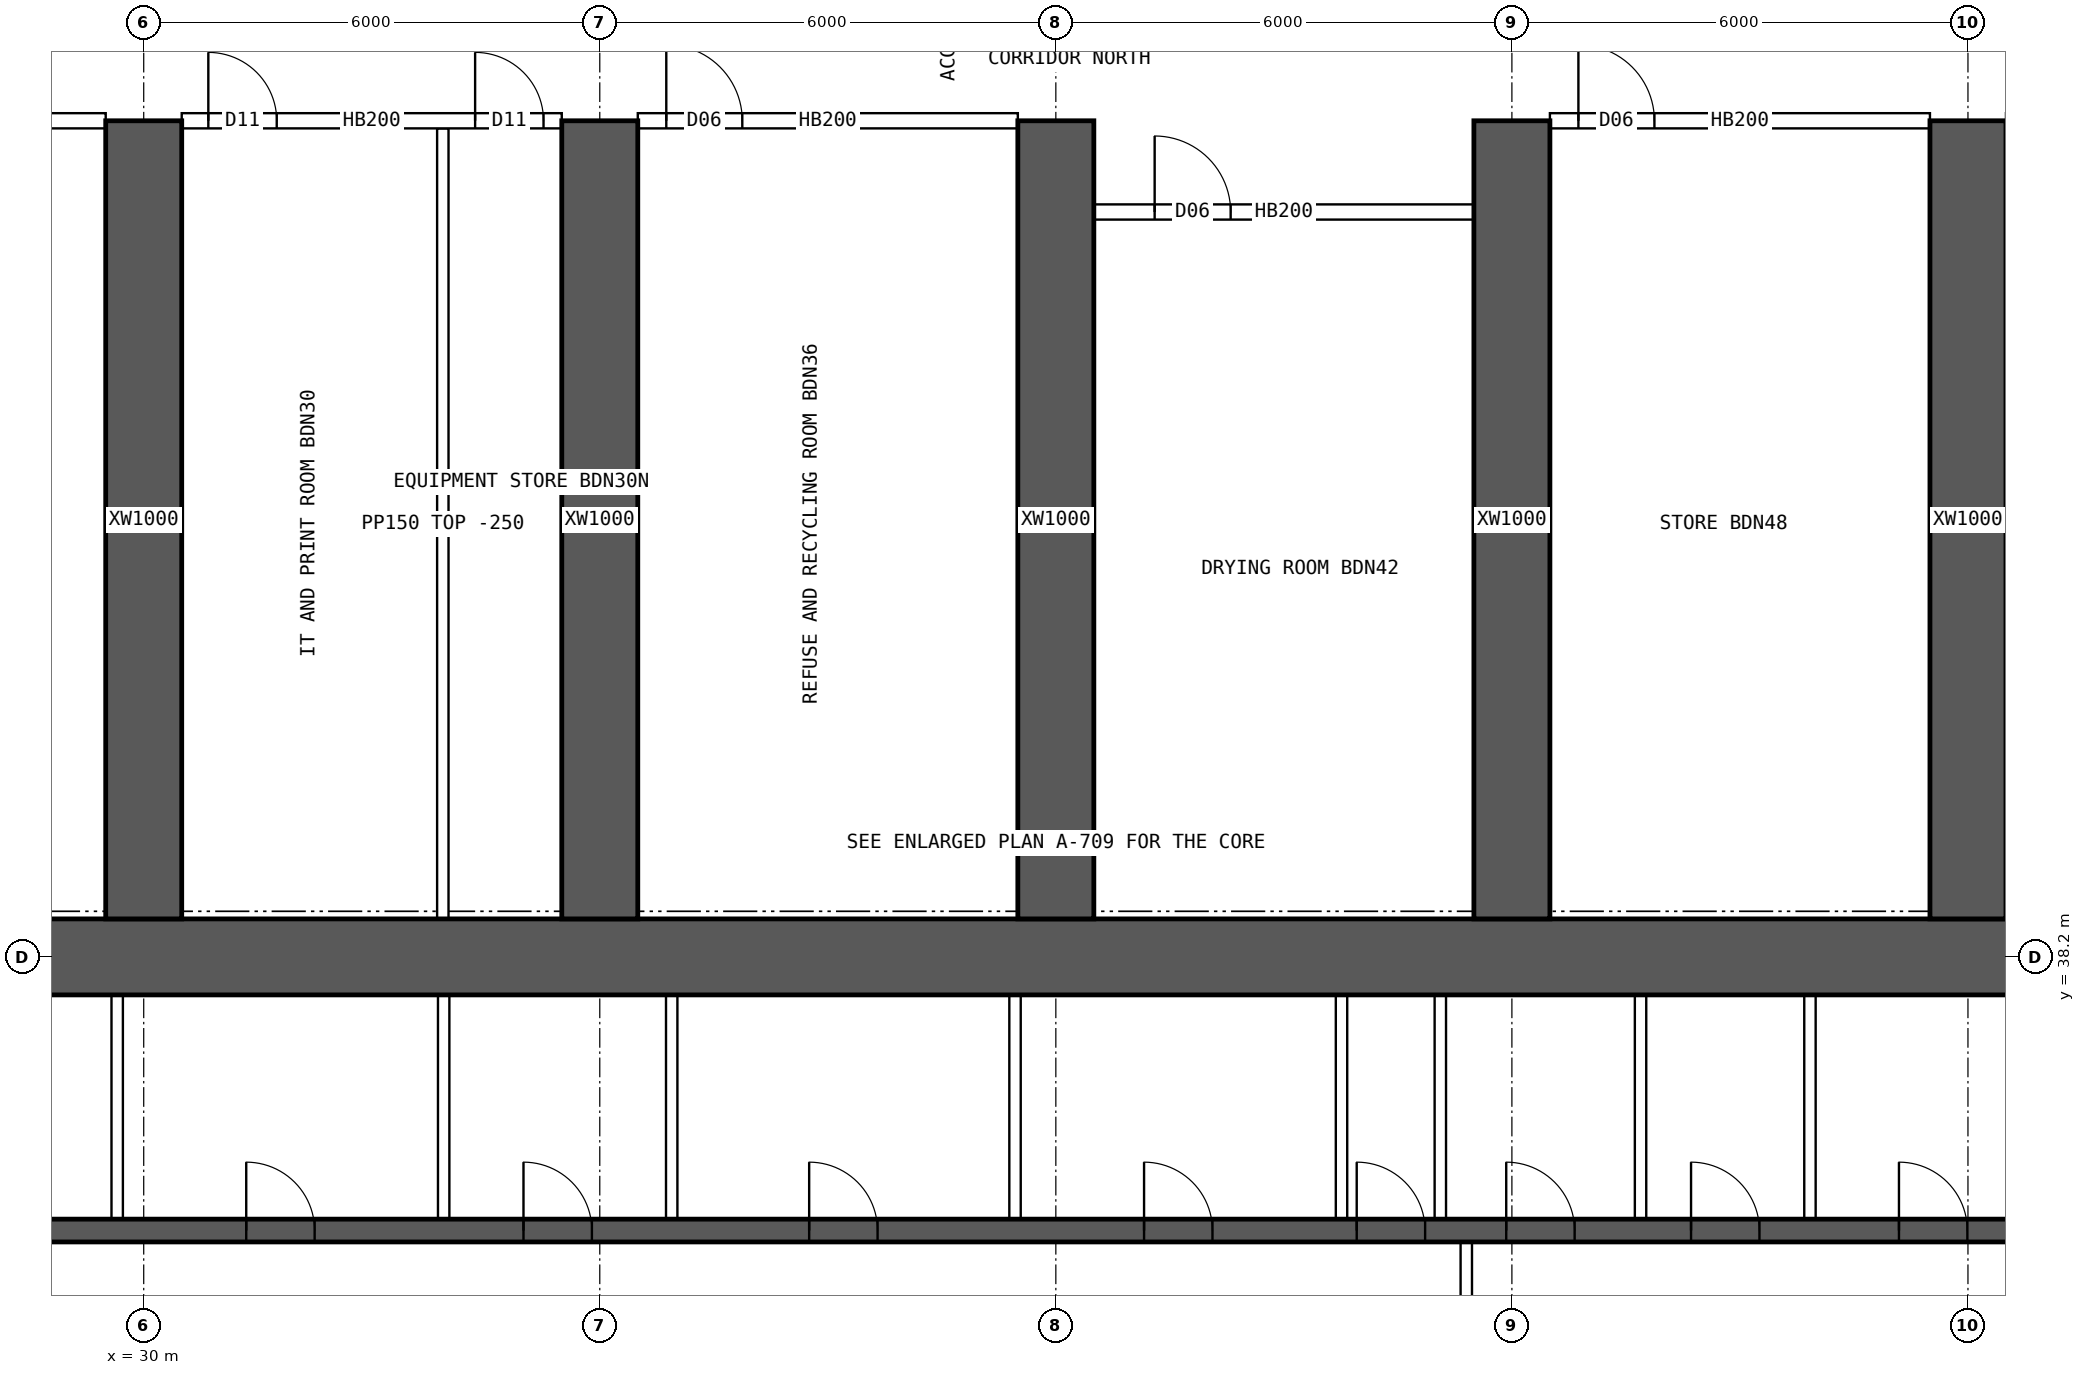
"""IFC4 building model, lengths in metres.
Left out: names, types, materials, properties, quantities, classifications, styles, units other than length and angle.
Written with IfcOpenShell. Run it as: python <this file> out.ifc"""

import sys

from ifc_helpers import new_model, si_unit, direction, frame, frame_2d, origin, place, context, subcontext, project, spatial, rectangle, extrude, element, fill, save


model = new_model("IFC4")
c1 = context("Model", 3, precision=1e-05, world=origin(), true_north=direction((0.0, 1.0)))
c2 = subcontext(c1, "Body", "Model", "MODEL_VIEW")
j1 = project(units=[si_unit("LENGTHUNIT", "METRE"), si_unit("PLANEANGLEUNIT", "RADIAN")], contexts=[c1])
p1 = place(None, origin())
s1 = spatial("IfcSite", under=j1, at=p1, CompositionType="ELEMENT")
p2 = place(p1, origin())
s2 = spatial("IfcBuilding", under=s1, at=p2, CompositionType="ELEMENT")
p3 = place(p2, frame((0.0, 0.0, 27.7)))
s3 = spatial("IfcBuildingStorey", under=s2, at=p3, CompositionType="ELEMENT", Elevation=27.7)
p4 = place(p3, frame((18.0, 38.2, 0.0), z_axis=(0.0, 0.0, 1.0), x_axis=(1.0, 0.0, 0.0)))
e1 = element("IfcWall", 1, at=p4, inside=s3, PredefinedType="SHEAR", context=c2, shape_type="SweptSolid", body=[
    extrude(rectangle(XDim=48.0, YDim=1.0, at=frame_2d((24.0, 0.0))), origin(), (0.0, 0.0, 1.0), 3.75),
])
p5 = place(p3, frame((18.5, 34.6, 0.0), z_axis=(0.0, 0.0, 1.0), x_axis=(1.0, 0.0, 0.0)))
e2 = element("IfcWall", 2, at=p5, inside=s3, PredefinedType="SHEAR", context=c2, shape_type="SweptSolid", body=[
    extrude(rectangle(XDim=47.0, YDim=0.3, at=frame_2d((23.5, 0.0))), origin(), (0.0, 0.0, 1.0), 3.75),
])
p6 = place(p5, frame((0.9, 0.0, 0.0)))
e3 = element("IfcOpeningElement", 3, at=p6, cuts=e2, PredefinedType="OPENING", context=c2, shape_type="SweptSolid", body=[
    extrude(rectangle(XDim=1.1, YDim=2.1, at=frame_2d((0.55, 1.05))), frame((0.0, 0.16, 0.0), z_axis=(0.0, -1.0, 0.0), x_axis=(1.0, 0.0, 0.0)), (0.0, 0.0, 1.0), 0.32),
])
p7 = place(p5, frame((45.0, 0.0, 0.0)))
e4 = element("IfcOpeningElement", 4, at=p7, cuts=e2, PredefinedType="OPENING", context=c2, shape_type="SweptSolid", body=[
    extrude(rectangle(XDim=1.1, YDim=2.1, at=frame_2d((0.55, 1.05))), frame((0.0, 0.16, 0.0), z_axis=(0.0, -1.0, 0.0), x_axis=(1.0, 0.0, 0.0)), (0.0, 0.0, 1.0), 0.32),
])
p8 = place(p5, frame((4.1, 0.0, 0.0)))
e5 = element("IfcOpeningElement", 5, at=p8, cuts=e2, PredefinedType="OPENING", context=c2, shape_type="SweptSolid", body=[
    extrude(rectangle(XDim=0.9, YDim=2.1, at=frame_2d((0.45, 1.05))), frame((0.0, 0.16, 0.0), z_axis=(0.0, -1.0, 0.0), x_axis=(1.0, 0.0, 0.0)), (0.0, 0.0, 1.0), 0.32),
])
p9 = place(p5, frame((42.0, 0.0, 0.0)))
e6 = element("IfcOpeningElement", 6, at=p9, cuts=e2, PredefinedType="OPENING", context=c2, shape_type="SweptSolid", body=[
    extrude(rectangle(XDim=0.9, YDim=2.1, at=frame_2d((0.45, 1.05))), frame((0.0, 0.16, 0.0), z_axis=(0.0, -1.0, 0.0), x_axis=(1.0, 0.0, 0.0)), (0.0, 0.0, 1.0), 0.32),
])
p10 = place(p5, frame((8.875, 0.0, 0.0)))
e7 = element("IfcOpeningElement", 7, at=p10, cuts=e2, PredefinedType="OPENING", context=c2, shape_type="SweptSolid", body=[
    extrude(rectangle(XDim=0.9, YDim=2.1, at=frame_2d((0.45, 1.05))), frame((0.0, 0.16, 0.0), z_axis=(0.0, -1.0, 0.0), x_axis=(1.0, 0.0, 0.0)), (0.0, 0.0, 1.0), 0.32),
])
p11 = place(p5, frame((12.849, 0.0, 0.0)))
e8 = element("IfcOpeningElement", 8, at=p11, cuts=e2, PredefinedType="OPENING", context=c2, shape_type="SweptSolid", body=[
    extrude(rectangle(XDim=0.9, YDim=2.1, at=frame_2d((0.45, 1.05))), frame((0.0, 0.16, 0.0), z_axis=(0.0, -1.0, 0.0), x_axis=(1.0, 0.0, 0.0)), (0.0, 0.0, 1.0), 0.32),
])
p12 = place(p5, frame((16.496, 0.0, 0.0)))
e9 = element("IfcOpeningElement", 9, at=p12, cuts=e2, PredefinedType="OPENING", context=c2, shape_type="SweptSolid", body=[
    extrude(rectangle(XDim=0.9, YDim=2.1, at=frame_2d((0.45, 1.05))), frame((0.0, 0.16, 0.0), z_axis=(0.0, -1.0, 0.0), x_axis=(1.0, 0.0, 0.0)), (0.0, 0.0, 1.0), 0.32),
])
p13 = place(p5, frame((20.255, 0.0, 0.0)))
e10 = element("IfcOpeningElement", 10, at=p13, cuts=e2, PredefinedType="OPENING", context=c2, shape_type="SweptSolid", body=[
    extrude(rectangle(XDim=0.9, YDim=2.1, at=frame_2d((0.45, 1.05))), frame((0.0, 0.16, 0.0), z_axis=(0.0, -1.0, 0.0), x_axis=(1.0, 0.0, 0.0)), (0.0, 0.0, 1.0), 0.32),
])
p14 = place(p5, frame((24.661, 0.0, 0.0)))
e11 = element("IfcOpeningElement", 11, at=p14, cuts=e2, PredefinedType="OPENING", context=c2, shape_type="SweptSolid", body=[
    extrude(rectangle(XDim=0.9, YDim=2.1, at=frame_2d((0.45, 1.05))), frame((0.0, 0.16, 0.0), z_axis=(0.0, -1.0, 0.0), x_axis=(1.0, 0.0, 0.0)), (0.0, 0.0, 1.0), 0.32),
])
p15 = place(p5, frame((27.458, 0.0, 0.0)))
e12 = element("IfcOpeningElement", 12, at=p15, cuts=e2, PredefinedType="OPENING", context=c2, shape_type="SweptSolid", body=[
    extrude(rectangle(XDim=0.9, YDim=2.1, at=frame_2d((0.45, 1.05))), frame((0.0, 0.16, 0.0), z_axis=(0.0, -1.0, 0.0), x_axis=(1.0, 0.0, 0.0)), (0.0, 0.0, 1.0), 0.32),
])
p16 = place(p5, frame((29.425, 0.0, 0.0)))
e13 = element("IfcOpeningElement", 13, at=p16, cuts=e2, PredefinedType="OPENING", context=c2, shape_type="SweptSolid", body=[
    extrude(rectangle(XDim=0.9, YDim=2.1, at=frame_2d((0.45, 1.05))), frame((0.0, 0.16, 0.0), z_axis=(0.0, -1.0, 0.0), x_axis=(1.0, 0.0, 0.0)), (0.0, 0.0, 1.0), 0.32),
])
p17 = place(p5, frame((31.857, 0.0, 0.0)))
e14 = element("IfcOpeningElement", 14, at=p17, cuts=e2, PredefinedType="OPENING", context=c2, shape_type="SweptSolid", body=[
    extrude(rectangle(XDim=0.9, YDim=2.1, at=frame_2d((0.45, 1.05))), frame((0.0, 0.16, 0.0), z_axis=(0.0, -1.0, 0.0), x_axis=(1.0, 0.0, 0.0)), (0.0, 0.0, 1.0), 0.32),
])
p18 = place(p5, frame((34.592, 0.0, 0.0)))
e15 = element("IfcOpeningElement", 15, at=p18, cuts=e2, PredefinedType="OPENING", context=c2, shape_type="SweptSolid", body=[
    extrude(rectangle(XDim=0.9, YDim=2.1, at=frame_2d((0.45, 1.05))), frame((0.0, 0.16, 0.0), z_axis=(0.0, -1.0, 0.0), x_axis=(1.0, 0.0, 0.0)), (0.0, 0.0, 1.0), 0.32),
])
p19 = place(p5, frame((37.632, 0.0, 0.0)))
e16 = element("IfcOpeningElement", 16, at=p19, cuts=e2, PredefinedType="OPENING", context=c2, shape_type="SweptSolid", body=[
    extrude(rectangle(XDim=0.9, YDim=2.1, at=frame_2d((0.45, 1.05))), frame((0.0, 0.16, 0.0), z_axis=(0.0, -1.0, 0.0), x_axis=(1.0, 0.0, 0.0)), (0.0, 0.0, 1.0), 0.32),
])
for number, where, z_axis, x_axis in (
    (17, (30.0, 38.7, 0.0), (0.0, 0.0, 1.0), (0.0, 1.0, 0.0)),
    (18, (36.0, 38.7, 0.0), (0.0, 0.0, 1.0), (0.0, 1.0, 0.0)),
    (19, (42.0, 38.7, 0.0), (0.0, 0.0, 1.0), (0.0, 1.0, 0.0)),
    (20, (48.0, 38.7, 0.0), (0.0, 0.0, 1.0), (0.0, 1.0, 0.0)),
    (21, (54.0, 38.7, 0.0), (0.0, 0.0, 1.0), (0.0, 1.0, 0.0)),
):
    element("IfcWall", number, at=place(p3, frame(where, z_axis=z_axis, x_axis=x_axis)), inside=s3, PredefinedType="SHEAR", context=c2, shape_type="SweptSolid", body=[
        extrude(rectangle(XDim=10.5, YDim=1.0, at=frame_2d((5.25, 0.0))), origin(), (0.0, 0.0, 1.0), 3.75),
    ])
p20 = place(p3, frame((47.4, 30.55, 0.0), z_axis=(0.0, 0.0, 1.0), x_axis=(0.0, 1.0, 0.0)))
e22 = element("IfcWall", 22, at=p20, inside=s3, PredefinedType="SOLIDWALL", context=c2, shape_type="SweptSolid", body=[
    extrude(rectangle(XDim=3.9, YDim=0.15, at=frame_2d((1.95, 0.0))), origin(), (0.0, 0.0, 1.0), 3.5),
])
p21 = place(p20, frame((1.15, 0.0, 0.0)))
e23 = element("IfcOpeningElement", 23, at=p21, cuts=e22, PredefinedType="OPENING", context=c2, shape_type="SweptSolid", body=[
    extrude(rectangle(XDim=1.6, YDim=2.1, at=frame_2d((0.8, 1.05))), frame((0.0, 0.085, 0.0), z_axis=(0.0, -1.0, 0.0), x_axis=(1.0, 0.0, 0.0)), (0.0, 0.0, 1.0), 0.17),
])
for number, where, z_axis, x_axis in (
    (24, (29.651, 34.75, 0.0), (0.0, 0.0, 1.0), (0.0, 1.0, 0.0)),
    (25, (33.946, 34.75, 0.0), (0.0, 0.0, 1.0), (0.0, 1.0, 0.0)),
    (26, (36.946, 34.75, 0.0), (0.0, 0.0, 1.0), (0.0, 1.0, 0.0)),
    (27, (41.463, 34.75, 0.0), (0.0, 0.0, 1.0), (0.0, 1.0, 0.0)),
    (28, (45.758, 34.75, 0.0), (0.0, 0.0, 1.0), (0.0, 1.0, 0.0)),
    (29, (47.058, 34.75, 0.0), (0.0, 0.0, 1.0), (0.0, 1.0, 0.0)),
    (30, (49.692, 34.75, 0.0), (0.0, 0.0, 1.0), (0.0, 1.0, 0.0)),
    (31, (51.921, 34.75, 0.0), (0.0, 0.0, 1.0), (0.0, 1.0, 0.0)),
):
    element("IfcWall", number, at=place(p3, frame(where, z_axis=z_axis, x_axis=x_axis)), inside=s3, PredefinedType="SOLIDWALL", context=c2, shape_type="SweptSolid", body=[
        extrude(rectangle(XDim=2.95, YDim=0.15, at=frame_2d((1.475, 0.0))), origin(), (0.0, 0.0, 1.0), 3.5),
    ])
p22 = place(p3, frame((24.5, 49.2, 0.0), z_axis=(0.0, 0.0, 1.0), x_axis=(1.0, 0.0, 0.0)))
e32 = element("IfcWall", 32, at=p22, inside=s3, PredefinedType="SOLIDWALL", context=c2, shape_type="SweptSolid", body=[
    extrude(rectangle(XDim=5.0, YDim=0.2, at=frame_2d((2.5, 0.0))), origin(), (0.0, 0.0, 1.0), 3.5),
])
p23 = place(p22, frame((0.15, 0.0, 0.0)))
e33 = element("IfcOpeningElement", 33, at=p23, cuts=e32, PredefinedType="OPENING", context=c2, shape_type="SweptSolid", body=[
    extrude(rectangle(XDim=0.9, YDim=2.1, at=frame_2d((0.45, 1.05))), frame((0.0, 0.11, 0.0), z_axis=(0.0, -1.0, 0.0), x_axis=(1.0, 0.0, 0.0)), (0.0, 0.0, 1.0), 0.22),
])
p24 = place(p22, frame((2.05, 0.0, 0.0)))
e34 = element("IfcOpeningElement", 34, at=p24, cuts=e32, PredefinedType="OPENING", context=c2, shape_type="SweptSolid", body=[
    extrude(rectangle(XDim=0.9, YDim=2.1, at=frame_2d((0.45, 1.05))), frame((0.0, 0.11, 0.0), z_axis=(0.0, -1.0, 0.0), x_axis=(1.0, 0.0, 0.0)), (0.0, 0.0, 1.0), 0.22),
])
p25 = place(p3, frame((30.5, 49.2, 0.0), z_axis=(0.0, 0.0, 1.0), x_axis=(1.0, 0.0, 0.0)))
e35 = element("IfcWall", 35, at=p25, inside=s3, PredefinedType="SOLIDWALL", context=c2, shape_type="SweptSolid", body=[
    extrude(rectangle(XDim=5.0, YDim=0.2, at=frame_2d((2.5, 0.0))), origin(), (0.0, 0.0, 1.0), 3.5),
])
p26 = place(p25, frame((0.35, 0.0, 0.0)))
e36 = element("IfcOpeningElement", 36, at=p26, cuts=e35, PredefinedType="OPENING", context=c2, shape_type="SweptSolid", body=[
    extrude(rectangle(XDim=0.9, YDim=2.1, at=frame_2d((0.45, 1.05))), frame((0.0, 0.11, 0.0), z_axis=(0.0, -1.0, 0.0), x_axis=(1.0, 0.0, 0.0)), (0.0, 0.0, 1.0), 0.22),
])
p27 = place(p25, frame((3.86, 0.0, 0.0)))
e37 = element("IfcOpeningElement", 37, at=p27, cuts=e35, PredefinedType="OPENING", context=c2, shape_type="SweptSolid", body=[
    extrude(rectangle(XDim=0.9, YDim=2.1, at=frame_2d((0.45, 1.05))), frame((0.0, 0.11, 0.0), z_axis=(0.0, -1.0, 0.0), x_axis=(1.0, 0.0, 0.0)), (0.0, 0.0, 1.0), 0.22),
])
p28 = place(p3, frame((36.5, 49.2, 0.0), z_axis=(0.0, 0.0, 1.0), x_axis=(1.0, 0.0, 0.0)))
e38 = element("IfcWall", 38, at=p28, inside=s3, PredefinedType="SOLIDWALL", context=c2, shape_type="SweptSolid", body=[
    extrude(rectangle(XDim=5.0, YDim=0.2, at=frame_2d((2.5, 0.0))), origin(), (0.0, 0.0, 1.0), 3.5),
])
p29 = place(p28, frame((0.375, 0.0, 0.0)))
e39 = element("IfcOpeningElement", 39, at=p29, cuts=e38, PredefinedType="OPENING", context=c2, shape_type="SweptSolid", body=[
    extrude(rectangle(XDim=1.0, YDim=2.1, at=frame_2d((0.5, 1.05))), frame((0.0, 0.11, 0.0), z_axis=(0.0, -1.0, 0.0), x_axis=(1.0, 0.0, 0.0)), (0.0, 0.0, 1.0), 0.22),
])
p30 = place(p3, frame((48.5, 49.2, 0.0), z_axis=(0.0, 0.0, 1.0), x_axis=(1.0, 0.0, 0.0)))
e40 = element("IfcWall", 40, at=p30, inside=s3, PredefinedType="SOLIDWALL", context=c2, shape_type="SweptSolid", body=[
    extrude(rectangle(XDim=5.0, YDim=0.2, at=frame_2d((2.5, 0.0))), origin(), (0.0, 0.0, 1.0), 3.5),
])
p31 = place(p30, frame((0.375, 0.0, 0.0)))
e41 = element("IfcOpeningElement", 41, at=p31, cuts=e40, PredefinedType="OPENING", context=c2, shape_type="SweptSolid", body=[
    extrude(rectangle(XDim=1.0, YDim=2.1, at=frame_2d((0.5, 1.05))), frame((0.0, 0.11, 0.0), z_axis=(0.0, -1.0, 0.0), x_axis=(1.0, 0.0, 0.0)), (0.0, 0.0, 1.0), 0.22),
])
p32 = place(p3, frame((33.935, 38.7, 0.0), z_axis=(0.0, 0.0, 1.0), x_axis=(0.0, 1.0, 0.0)))
e42 = element("IfcWall", 42, at=p32, inside=s3, PredefinedType="PARTITIONING", context=c2, shape_type="SweptSolid", body=[
    extrude(rectangle(XDim=10.4, YDim=0.15, at=frame_2d((5.2, 0.0))), origin(), (0.0, 0.0, 1.0), 3.5),
])
p33 = place(p3, frame((42.5, 48.0, 0.0), z_axis=(0.0, 0.0, 1.0), x_axis=(1.0, 0.0, 0.0)))
e43 = element("IfcWall", 43, at=p33, inside=s3, PredefinedType="SOLIDWALL", context=c2, shape_type="SweptSolid", body=[
    extrude(rectangle(XDim=5.0, YDim=0.2, at=frame_2d((2.5, 0.0))), origin(), (0.0, 0.0, 1.0), 3.5),
])
p34 = place(p33, frame((0.8, 0.0, 0.0)))
e44 = element("IfcOpeningElement", 44, at=p34, cuts=e43, PredefinedType="OPENING", context=c2, shape_type="SweptSolid", body=[
    extrude(rectangle(XDim=1.0, YDim=2.1, at=frame_2d((0.5, 1.05))), frame((0.0, 0.11, 0.0), z_axis=(0.0, -1.0, 0.0), x_axis=(1.0, 0.0, 0.0)), (0.0, 0.0, 1.0), 0.22),
])
p35 = place(p11, origin())
e45 = element("IfcDoor", 45, at=p35, inside=s3, OperationType="SINGLE_SWING_LEFT", PredefinedType="DOOR", context=c2, shape_type="SweptSolid", body=[
    extrude(rectangle(XDim=0.9, YDim=2.1, at=frame_2d((0.45, 1.05))), frame((0.0, 0.025, 0.0), z_axis=(0.0, -1.0, 0.0), x_axis=(1.0, 0.0, 0.0)), (0.0, 0.0, 1.0), 0.05),
])
fill(e8, e45)
p36 = place(p12, origin())
e46 = element("IfcDoor", 46, at=p36, inside=s3, OperationType="SINGLE_SWING_LEFT", PredefinedType="DOOR", context=c2, shape_type="SweptSolid", body=[
    extrude(rectangle(XDim=0.9, YDim=2.1, at=frame_2d((0.45, 1.05))), frame((0.0, 0.025, 0.0), z_axis=(0.0, -1.0, 0.0), x_axis=(1.0, 0.0, 0.0)), (0.0, 0.0, 1.0), 0.05),
])
fill(e9, e46)
p37 = place(p13, origin())
e47 = element("IfcDoor", 47, at=p37, inside=s3, OperationType="SINGLE_SWING_LEFT", PredefinedType="DOOR", context=c2, shape_type="SweptSolid", body=[
    extrude(rectangle(XDim=0.9, YDim=2.1, at=frame_2d((0.45, 1.05))), frame((0.0, 0.025, 0.0), z_axis=(0.0, -1.0, 0.0), x_axis=(1.0, 0.0, 0.0)), (0.0, 0.0, 1.0), 0.05),
])
fill(e10, e47)
p38 = place(p14, origin())
e48 = element("IfcDoor", 48, at=p38, inside=s3, OperationType="SINGLE_SWING_LEFT", PredefinedType="DOOR", context=c2, shape_type="SweptSolid", body=[
    extrude(rectangle(XDim=0.9, YDim=2.1, at=frame_2d((0.45, 1.05))), frame((0.0, 0.025, 0.0), z_axis=(0.0, -1.0, 0.0), x_axis=(1.0, 0.0, 0.0)), (0.0, 0.0, 1.0), 0.05),
])
fill(e11, e48)
p39 = place(p15, origin())
e49 = element("IfcDoor", 49, at=p39, inside=s3, OperationType="SINGLE_SWING_LEFT", PredefinedType="DOOR", context=c2, shape_type="SweptSolid", body=[
    extrude(rectangle(XDim=0.9, YDim=2.1, at=frame_2d((0.45, 1.05))), frame((0.0, 0.025, 0.0), z_axis=(0.0, -1.0, 0.0), x_axis=(1.0, 0.0, 0.0)), (0.0, 0.0, 1.0), 0.05),
])
fill(e12, e49)
p40 = place(p16, origin())
e50 = element("IfcDoor", 50, at=p40, inside=s3, OperationType="SINGLE_SWING_LEFT", PredefinedType="DOOR", context=c2, shape_type="SweptSolid", body=[
    extrude(rectangle(XDim=0.9, YDim=2.1, at=frame_2d((0.45, 1.05))), frame((0.0, 0.025, 0.0), z_axis=(0.0, -1.0, 0.0), x_axis=(1.0, 0.0, 0.0)), (0.0, 0.0, 1.0), 0.05),
])
fill(e13, e50)
p41 = place(p17, origin())
e51 = element("IfcDoor", 51, at=p41, inside=s3, OperationType="SINGLE_SWING_LEFT", PredefinedType="DOOR", context=c2, shape_type="SweptSolid", body=[
    extrude(rectangle(XDim=0.9, YDim=2.1, at=frame_2d((0.45, 1.05))), frame((0.0, 0.025, 0.0), z_axis=(0.0, -1.0, 0.0), x_axis=(1.0, 0.0, 0.0)), (0.0, 0.0, 1.0), 0.05),
])
fill(e14, e51)
p42 = place(p18, origin())
e52 = element("IfcDoor", 52, at=p42, inside=s3, OperationType="SINGLE_SWING_LEFT", PredefinedType="DOOR", context=c2, shape_type="SweptSolid", body=[
    extrude(rectangle(XDim=0.9, YDim=2.1, at=frame_2d((0.45, 1.05))), frame((0.0, 0.025, 0.0), z_axis=(0.0, -1.0, 0.0), x_axis=(1.0, 0.0, 0.0)), (0.0, 0.0, 1.0), 0.05),
])
fill(e15, e52)
p43 = place(p26, origin())
e53 = element("IfcDoor", 53, at=p43, inside=s3, OperationType="SINGLE_SWING_LEFT", PredefinedType="DOOR", context=c2, shape_type="SweptSolid", body=[
    extrude(rectangle(XDim=0.9, YDim=2.1, at=frame_2d((0.45, 1.05))), frame((0.0, 0.025, 0.0), z_axis=(0.0, -1.0, 0.0), x_axis=(1.0, 0.0, 0.0)), (0.0, 0.0, 1.0), 0.05),
])
fill(e36, e53)
p44 = place(p27, origin())
e54 = element("IfcDoor", 54, at=p44, inside=s3, OperationType="SINGLE_SWING_LEFT", PredefinedType="DOOR", context=c2, shape_type="SweptSolid", body=[
    extrude(rectangle(XDim=0.9, YDim=2.1, at=frame_2d((0.45, 1.05))), frame((0.0, 0.025, 0.0), z_axis=(0.0, -1.0, 0.0), x_axis=(1.0, 0.0, 0.0)), (0.0, 0.0, 1.0), 0.05),
])
fill(e37, e54)
p45 = place(p29, origin())
e55 = element("IfcDoor", 55, at=p45, inside=s3, OperationType="SINGLE_SWING_LEFT", PredefinedType="DOOR", context=c2, shape_type="SweptSolid", body=[
    extrude(rectangle(XDim=1.0, YDim=2.1, at=frame_2d((0.5, 1.05))), frame((0.0, 0.025, 0.0), z_axis=(0.0, -1.0, 0.0), x_axis=(1.0, 0.0, 0.0)), (0.0, 0.0, 1.0), 0.05),
])
fill(e39, e55)
p46 = place(p34, origin())
e56 = element("IfcDoor", 56, at=p46, inside=s3, OperationType="SINGLE_SWING_LEFT", PredefinedType="DOOR", context=c2, shape_type="SweptSolid", body=[
    extrude(rectangle(XDim=1.0, YDim=2.1, at=frame_2d((0.5, 1.05))), frame((0.0, 0.025, 0.0), z_axis=(0.0, -1.0, 0.0), x_axis=(1.0, 0.0, 0.0)), (0.0, 0.0, 1.0), 0.05),
])
fill(e44, e56)
p47 = place(p31, origin())
e57 = element("IfcDoor", 57, at=p47, inside=s3, OperationType="SINGLE_SWING_LEFT", PredefinedType="DOOR", context=c2, shape_type="SweptSolid", body=[
    extrude(rectangle(XDim=1.0, YDim=2.1, at=frame_2d((0.5, 1.05))), frame((0.0, 0.025, 0.0), z_axis=(0.0, -1.0, 0.0), x_axis=(1.0, 0.0, 0.0)), (0.0, 0.0, 1.0), 0.05),
])
fill(e41, e57)
save(model, sys.argv[1])
